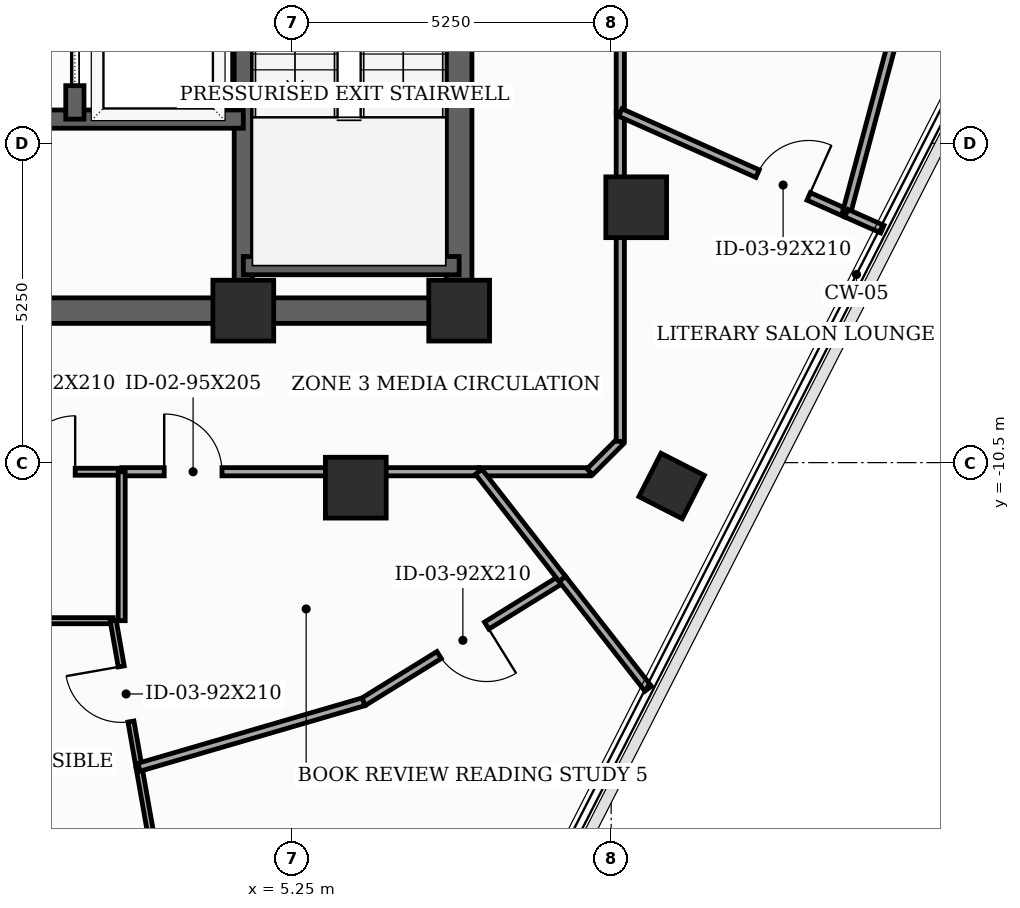
"""IFC4 building model, lengths in metres.
Left out: names, types, materials, properties, quantities, classifications, styles, units other than length and angle.
Written with IfcOpenShell. Run it as: python <this file> out.ifc"""

import sys

from ifc_helpers import new_model, si_unit, direction, frame, frame_2d, origin, origin_2d, place, context, subcontext, project, spatial, rectangle, extrude, element, fill, save


model = new_model("IFC4")
c1 = context("Model", 3, precision=1e-05, world=origin(), true_north=direction((0.0, 1.0)))
c2 = subcontext(c1, "Body", "Model", "MODEL_VIEW")
j1 = project(units=[si_unit("LENGTHUNIT", "METRE"), si_unit("PLANEANGLEUNIT", "RADIAN")], contexts=[c1])
p1 = place(None, origin())
s1 = spatial("IfcSite", under=j1, at=p1, CompositionType="ELEMENT")
p2 = place(p1, origin())
s2 = spatial("IfcBuilding", under=s1, at=p2, CompositionType="ELEMENT")
p3 = place(p2, frame((0.0, 0.0, 248.5)))
s3 = spatial("IfcBuildingStorey", under=s2, at=p3, CompositionType="ELEMENT", Elevation=248.5)
for number, where, z_axis, x_axis in (
    (1, (4.45, -8.0, 0.0), (0.0, 0.0, 1.0), (1.0, 0.0, 0.0)),
    (2, (8.0, -8.0, 0.0), (0.0, 0.0, 1.0), (1.0, 0.0, 0.0)),
    (3, (6.3, -10.912, 0.0), (0.0, 0.0, 1.0), (1.0, 0.0, 0.0)),
    (4, (10.912, -6.3, 0.0), (0.0, 0.0, 1.0), (1.0, 0.0, 0.0)),
):
    element("IfcColumn", number, at=place(p3, frame(where, z_axis=z_axis, x_axis=x_axis)), inside=s3, PredefinedType="COLUMN", context=c2, shape_type="SweptSolid", body=[
        extrude(rectangle(XDim=1.0, YDim=1.0, at=origin_2d()), origin(), (0.0, 0.0, 1.0), 3.7),
    ])
p4 = place(p3, frame((11.494, -10.885, 0.0), z_axis=(0.0, 0.0, 1.0), x_axis=(0.45399049974, 0.891006524188, 0.0)))
e5 = element("IfcColumn", 5, at=p4, inside=s3, PredefinedType="COLUMN", context=c2, shape_type="SweptSolid", body=[
    extrude(rectangle(XDim=0.8, YDim=0.8, at=origin_2d()), origin(), (0.0, 0.0, 1.0), 3.7),
])
p5 = place(p3, frame((8.0, -8.0, 0.0), z_axis=(0.0, 0.0, 1.0), x_axis=(0.0, 1.0, 0.0)))
e6 = element("IfcWall", 6, at=p5, inside=s3, PredefinedType="SHEAR", context=c2, shape_type="SweptSolid", body=[
    extrude(rectangle(XDim=16.0, YDim=0.42, at=frame_2d((8.0, 0.0))), origin(), (0.0, 0.0, 1.0), 3.5),
])
p6 = place(p5, frame((9.6, 0.0, 0.0)))
e7 = element("IfcOpeningElement", 7, at=p6, cuts=e6, PredefinedType="OPENING", context=c2, shape_type="SweptSolid", body=[
    extrude(rectangle(XDim=1.05, YDim=2.15, at=frame_2d((0.525, 1.075))), frame((0.0, 0.22, 0.0), z_axis=(0.0, -1.0, 0.0), x_axis=(1.0, 0.0, 0.0)), (0.0, 0.0, 1.0), 0.44),
])
p7 = place(p5, frame((14.469, 0.0, 0.0)))
e8 = element("IfcOpeningElement", 8, at=p7, cuts=e6, PredefinedType="OPENING", context=c2, shape_type="SweptSolid", body=[
    extrude(rectangle(XDim=0.85, YDim=2.02, at=frame_2d((0.425, 1.01))), frame((0.0, 0.22, 0.0), z_axis=(0.0, -1.0, 0.0), x_axis=(1.0, 0.0, 0.0)), (0.0, 0.0, 1.0), 0.44),
])
p8 = place(p3, frame((-8.0, -8.0, 0.0), z_axis=(0.0, 0.0, 1.0), x_axis=(1.0, 0.0, 0.0)))
e9 = element("IfcWall", 9, at=p8, inside=s3, PredefinedType="SHEAR", context=c2, shape_type="SweptSolid", body=[
    extrude(rectangle(XDim=16.0, YDim=0.42, at=frame_2d((8.0, 0.0))), origin(), (0.0, 0.0, 1.0), 3.5),
])
p9 = place(p8, frame((7.52, 0.0, 0.0)))
e10 = element("IfcOpeningElement", 10, at=p9, cuts=e9, PredefinedType="OPENING", context=c2, shape_type="SweptSolid", body=[
    extrude(rectangle(XDim=0.95, YDim=2.1, at=frame_2d((0.475, 1.05))), frame((0.0, 0.22, 0.0), z_axis=(0.0, -1.0, 0.0), x_axis=(1.0, 0.0, 0.0)), (0.0, 0.0, 1.0), 0.44),
])
p10 = place(p3, frame((4.45, -7.79, 0.0), z_axis=(0.0, 0.0, 1.0), x_axis=(0.0, 1.0, 0.0)))
e11 = element("IfcWall", 11, at=p10, inside=s3, PredefinedType="SHEAR", context=c2, shape_type="SweptSolid", body=[
    extrude(rectangle(XDim=15.58, YDim=0.3, at=frame_2d((7.79, 0.0))), origin(), (0.0, 0.0, 1.0), 3.5),
])
p11 = place(p3, frame((4.45, -7.26, 0.0), z_axis=(0.0, 0.0, 1.0), x_axis=(1.0, 0.0, 0.0)))
e12 = element("IfcWall", 12, at=p11, inside=s3, PredefinedType="SHEAR", context=c2, shape_type="SweptSolid", body=[
    extrude(rectangle(XDim=3.55, YDim=0.3, at=frame_2d((1.775, 0.0))), origin(), (0.0, 0.0, 1.0), 3.5),
])
p12 = place(p3, frame((-4.45, -4.85, 0.0), z_axis=(0.0, 0.0, 1.0), x_axis=(1.0, 0.0, 0.0)))
e13 = element("IfcWall", 13, at=p12, inside=s3, PredefinedType="SHEAR", context=c2, shape_type="SweptSolid", body=[
    extrude(rectangle(XDim=8.9, YDim=0.3, at=frame_2d((4.45, 0.0))), origin(), (0.0, 0.0, 1.0), 3.5),
])
p13 = place(p3, frame((1.68, -4.85, 0.0), z_axis=(0.0, 0.0, 1.0), x_axis=(0.0, 1.0, 0.0)))
e14 = element("IfcWall", 14, at=p13, inside=s3, PredefinedType="SHEAR", context=c2, shape_type="SweptSolid", body=[
    extrude(rectangle(XDim=12.64, YDim=0.3, at=frame_2d((6.32, 0.0))), origin(), (0.0, 0.0, 1.0), 3.5),
])
p14 = place(p13, frame((0.55, 0.0, 0.0)))
e15 = element("IfcOpeningElement", 15, at=p14, cuts=e14, PredefinedType="OPENING", context=c2, shape_type="SweptSolid", body=[
    extrude(rectangle(XDim=1.1, YDim=2.1, at=frame_2d((0.55, 1.05))), frame((0.0, 0.16, 0.0), z_axis=(0.0, -1.0, 0.0), x_axis=(1.0, 0.0, 0.0)), (0.0, 0.0, 1.0), 0.32),
])
p15 = place(p13, frame((2.65, 0.0, 0.0)))
e16 = element("IfcOpeningElement", 16, at=p15, cuts=e14, PredefinedType="OPENING", context=c2, shape_type="SweptSolid", body=[
    extrude(rectangle(XDim=1.1, YDim=2.1, at=frame_2d((0.55, 1.05))), frame((0.0, 0.16, 0.0), z_axis=(0.0, -1.0, 0.0), x_axis=(1.0, 0.0, 0.0)), (0.0, 0.0, 1.0), 0.32),
])
p16 = place(p13, frame((4.75, 0.0, 0.0)))
e17 = element("IfcOpeningElement", 17, at=p16, cuts=e14, PredefinedType="OPENING", context=c2, shape_type="SweptSolid", body=[
    extrude(rectangle(XDim=1.1, YDim=2.1, at=frame_2d((0.55, 1.05))), frame((0.0, 0.16, 0.0), z_axis=(0.0, -1.0, 0.0), x_axis=(1.0, 0.0, 0.0)), (0.0, 0.0, 1.0), 0.32),
])
p17 = place(p13, frame((8.9, 0.0, 0.0)))
e18 = element("IfcOpeningElement", 18, at=p17, cuts=e14, PredefinedType="OPENING", context=c2, shape_type="SweptSolid", body=[
    extrude(rectangle(XDim=0.95, YDim=2.1, at=frame_2d((0.475, 1.05))), frame((0.0, 0.16, 0.0), z_axis=(0.0, -1.0, 0.0), x_axis=(1.0, 0.0, 0.0)), (0.0, 0.0, 1.0), 0.32),
])
p18 = place(p3, frame((10.65, -4.742, 0.0), z_axis=(0.0, 0.0, 1.0), x_axis=(0.0, 1.0, 0.0)))
e19 = element("IfcWall", 19, at=p18, inside=s3, PredefinedType="PARTITIONING", context=c2, shape_type="SweptSolid", body=[
    extrude(rectangle(XDim=6.224, YDim=0.135, at=frame_2d((3.112, 0.0))), origin(), (0.0, 0.0, 1.0), 2.885),
])
p19 = place(p18, frame((2.637, 0.0, 0.0)))
e20 = element("IfcOpeningElement", 20, at=p19, cuts=e19, PredefinedType="OPENING", context=c2, shape_type="SweptSolid", body=[
    extrude(rectangle(XDim=0.95, YDim=2.1, at=frame_2d((0.475, 1.05))), frame((0.0, 0.077, 0.0), z_axis=(0.0, -1.0, 0.0), x_axis=(1.0, 0.0, 0.0)), (0.0, 0.0, 1.0), 0.155),
])
p20 = place(p3, frame((0.0, -10.65, 0.0), z_axis=(0.0, 0.0, 1.0), x_axis=(1.0, 0.0, 0.0)))
e21 = element("IfcWall", 21, at=p20, inside=s3, PredefinedType="PARTITIONING", context=c2, shape_type="SweptSolid", body=[
    extrude(rectangle(XDim=2.45, YDim=0.115, at=frame_2d((1.225, 0.0))), origin(), (0.0, 0.0, 1.0), 3.5),
])
p21 = place(p20, frame((0.765, 0.0, 0.0)))
e22 = element("IfcOpeningElement", 22, at=p21, cuts=e21, PredefinedType="OPENING", context=c2, shape_type="SweptSolid", body=[
    extrude(rectangle(XDim=0.92, YDim=2.1, at=frame_2d((0.46, 1.05))), frame((0.0, 0.067, 0.0), z_axis=(0.0, -1.0, 0.0), x_axis=(1.0, 0.0, 0.0)), (0.0, 0.0, 1.0), 0.135),
])
p22 = place(p3, frame((2.45, -10.65, 0.0), z_axis=(0.0, 0.0, 1.0), x_axis=(1.0, 0.0, 0.0)))
e23 = element("IfcWall", 23, at=p22, inside=s3, PredefinedType="PARTITIONING", context=c2, shape_type="SweptSolid", body=[
    extrude(rectangle(XDim=5.871, YDim=0.135, at=frame_2d((2.936, 0.0))), origin(), (0.0, 0.0, 1.0), 2.075),
])
p23 = place(p22, frame((0.699, 0.0, 0.0)))
e24 = element("IfcOpeningElement", 24, at=p23, cuts=e23, PredefinedType="OPENING", context=c2, shape_type="SweptSolid", body=[
    extrude(rectangle(XDim=0.95, YDim=2.025, at=frame_2d((0.475, 1.012))), frame((0.0, 0.077, 0.0), z_axis=(0.0, -1.0, 0.0), x_axis=(1.0, 0.0, 0.0)), (0.0, 0.0, 1.0), 0.155),
])
p24 = place(p3, frame((8.321, -10.65, 0.0), z_axis=(0.0, 0.0, 1.0), x_axis=(1.0, 0.0, 0.0)))
e25 = element("IfcWall", 25, at=p24, inside=s3, PredefinedType="PARTITIONING", context=c2, shape_type="SweptSolid", body=[
    extrude(rectangle(XDim=1.829, YDim=0.135, at=frame_2d((0.915, 0.0))), origin(), (0.0, 0.0, 1.0), 2.075),
])
p25 = place(p3, frame((10.15, -10.65, 0.0), z_axis=(0.0, 0.0, 1.0), x_axis=(0.707106781187, 0.707106781187, 0.0)))
e26 = element("IfcWall", 26, at=p25, inside=s3, PredefinedType="PARTITIONING", context=c2, shape_type="SweptSolid", body=[
    extrude(rectangle(XDim=0.707, YDim=0.135, at=frame_2d((0.354, 0.0))), origin(), (0.0, 0.0, 1.0), 2.075),
])
p26 = place(p3, frame((10.65, -10.15, 0.0), z_axis=(0.0, 0.0, 1.0), x_axis=(0.0, 1.0, 0.0)))
e27 = element("IfcWall", 27, at=p26, inside=s3, PredefinedType="PARTITIONING", context=c2, shape_type="SweptSolid", body=[
    extrude(rectangle(XDim=5.408, YDim=0.135, at=frame_2d((2.704, 0.0))), origin(), (0.0, 0.0, 1.0), 2.885),
])
p27 = place(p3, frame((10.65, -4.742, 0.0), z_axis=(0.0, 0.0, 1.0), x_axis=(0.913526929547, -0.406778255309, 0.0)))
e28 = element("IfcWall", 28, at=p27, inside=s3, PredefinedType="PARTITIONING", context=c2, shape_type="SweptSolid", body=[
    extrude(rectangle(XDim=4.071, YDim=0.135, at=frame_2d((2.036, 0.0))), origin(), (0.0, 0.0, 1.0), 2.885),
])
p28 = place(p27, frame((2.471, 0.0, 0.0)))
e29 = element("IfcOpeningElement", 29, at=p28, cuts=e28, PredefinedType="OPENING", context=c2, shape_type="SweptSolid", body=[
    extrude(rectangle(XDim=0.92, YDim=2.1, at=frame_2d((0.46, 1.05))), frame((0.0, 0.077, 0.0), z_axis=(0.0, -1.0, 0.0), x_axis=(1.0, 0.0, 0.0)), (0.0, 0.0, 1.0), 0.155),
])
p29 = place(p3, frame((14.369, -6.398, 0.0), z_axis=(0.0, 0.0, 1.0), x_axis=(0.258820640976, 0.965925398675, 0.0)))
e30 = element("IfcWall", 30, at=p29, inside=s3, PredefinedType="PARTITIONING", context=c2, shape_type="SweptSolid", body=[
    extrude(rectangle(XDim=5.34, YDim=0.135, at=frame_2d((2.67, 0.0))), origin(), (0.0, 0.0, 1.0), 3.025),
])
p30 = place(p3, frame((2.31, -13.1, 0.0), z_axis=(0.0, 0.0, 1.0), x_axis=(-1.0, 0.0, 0.0)))
e31 = element("IfcWall", 31, at=p30, inside=s3, PredefinedType="MOVABLE", context=c2, shape_type="SweptSolid", body=[
    extrude(rectangle(XDim=2.31, YDim=0.1, at=frame_2d((1.155, 0.0))), origin(), (0.0, 0.0, 1.0), 3.5),
])
p31 = place(p3, frame((4.719, -26.759, 0.0), z_axis=(0.0, 0.0, 1.0), x_axis=(-0.173635361328, 0.984810012793, 0.0)))
e32 = element("IfcWall", 32, at=p31, inside=s3, PredefinedType="MOVABLE", context=c2, shape_type="SweptSolid", body=[
    extrude(rectangle(XDim=11.423, YDim=0.1, at=frame_2d((5.711, 0.0))), origin(), (0.0, 0.0, 1.0), 3.035),
])
p32 = place(p3, frame((2.735, -15.51, 0.0), z_axis=(0.0, 0.0, 1.0), x_axis=(-0.173694270709, 0.984799624453, 0.0)))
e33 = element("IfcWall", 33, at=p32, inside=s3, PredefinedType="MOVABLE", context=c2, shape_type="SweptSolid", body=[
    extrude(rectangle(XDim=2.447, YDim=0.1, at=frame_2d((1.224, 0.0))), origin(), (0.0, 0.0, 1.0), 3.185),
])
p33 = place(p32, frame((0.764, 0.0, 0.0)))
e34 = element("IfcOpeningElement", 34, at=p33, cuts=e33, PredefinedType="OPENING", context=c2, shape_type="SweptSolid", body=[
    extrude(rectangle(XDim=0.92, YDim=2.1, at=frame_2d((0.46, 1.05))), frame((0.0, 0.06, 0.0), z_axis=(0.0, -1.0, 0.0), x_axis=(1.0, 0.0, 0.0)), (0.0, 0.0, 1.0), 0.12),
])
p34 = place(p3, frame((2.45, -13.1, 0.0), z_axis=(0.0, 0.0, 1.0), x_axis=(0.0, 1.0, 0.0)))
e35 = element("IfcWall", 35, at=p34, inside=s3, PredefinedType="PARTITIONING", context=c2, shape_type="SweptSolid", body=[
    extrude(rectangle(XDim=2.45, YDim=0.115, at=frame_2d((1.225, 0.0))), origin(), (0.0, 0.0, 1.0), 2.885),
])
p35 = place(p3, frame((9.696, -12.411, 0.0), z_axis=(0.0, 0.0, 1.0), x_axis=(-0.850393663863, -0.526146953295, 0.0)))
e36 = element("IfcWall", 36, at=p35, inside=s3, PredefinedType="PARTITIONING", context=c2, shape_type="SweptSolid", body=[
    extrude(rectangle(XDim=3.845, YDim=0.135, at=frame_2d((1.923, 0.0))), origin(), (0.0, 0.0, 1.0), 3.035),
])
p36 = place(p35, frame((1.463, 0.0, 0.0)))
e37 = element("IfcOpeningElement", 37, at=p36, cuts=e36, PredefinedType="OPENING", context=c2, shape_type="SweptSolid", body=[
    extrude(rectangle(XDim=0.92, YDim=2.1, at=frame_2d((0.46, 1.05))), frame((0.0, 0.077, 0.0), z_axis=(0.0, -1.0, 0.0), x_axis=(1.0, 0.0, 0.0)), (0.0, 0.0, 1.0), 0.155),
])
p37 = place(p3, frame((6.426, -14.434, 0.0), z_axis=(0.0, 0.0, 1.0), x_axis=(-0.960041241254, -0.279858562654, 0.0)))
e38 = element("IfcWall", 38, at=p37, inside=s3, PredefinedType="PARTITIONING", context=c2, shape_type="SweptSolid", body=[
    extrude(rectangle(XDim=3.844, YDim=0.135, at=frame_2d((1.922, 0.0))), origin(), (0.0, 0.0, 1.0), 3.185),
])
p38 = place(p3, frame((11.108, -14.218, 0.0), z_axis=(0.0, 0.0, 1.0), x_axis=(-0.615736984334, 0.787951753677, 0.0)))
e39 = element("IfcWall", 39, at=p38, inside=s3, PredefinedType="PARTITIONING", context=c2, shape_type="SweptSolid", body=[
    extrude(rectangle(XDim=2.294, YDim=0.135, at=frame_2d((1.147, 0.0))), origin(), (0.0, 0.0, 1.0), 3.025),
])
p39 = place(p3, frame((9.696, -12.411, 0.0), z_axis=(0.0, 0.0, 1.0), x_axis=(-0.615429845305, 0.788191668002, 0.0)))
e40 = element("IfcWall", 40, at=p39, inside=s3, PredefinedType="PARTITIONING", context=c2, shape_type="SweptSolid", body=[
    extrude(rectangle(XDim=2.234, YDim=0.135, at=frame_2d((1.117, 0.0))), origin(), (0.0, 0.0, 1.0), 2.075),
])
p40 = place(p3, frame((14.959, -6.66, 0.0), z_axis=(0.0, 0.0, 1.0), x_axis=(-0.913967286969, 0.405787873586, 0.0)))
e41 = element("IfcWall", 41, at=p40, inside=s3, PredefinedType="PARTITIONING", context=c2, shape_type="SweptSolid", body=[
    extrude(rectangle(XDim=0.646, YDim=0.135, at=frame_2d((0.323, 0.0))), origin(), (0.0, 0.0, 1.0), 3.49),
])
p41 = place(p14, origin())
e42 = element("IfcDoor", 42, at=p41, inside=s3, OperationType="SLIDING_TO_LEFT", PredefinedType="DOOR", context=c2, shape_type="SweptSolid", body=[
    extrude(rectangle(XDim=1.1, YDim=2.1, at=frame_2d((0.55, 1.05))), frame((0.0, 0.025, 0.0), z_axis=(0.0, -1.0, 0.0), x_axis=(1.0, 0.0, 0.0)), (0.0, 0.0, 1.0), 0.05),
])
fill(e15, e42)
p42 = place(p21, origin())
e43 = element("IfcDoor", 43, at=p42, inside=s3, OperationType="SINGLE_SWING_RIGHT", PredefinedType="DOOR", context=c2, shape_type="SweptSolid", body=[
    extrude(rectangle(XDim=0.92, YDim=2.1, at=frame_2d((0.46, 1.05))), frame((0.0, 0.025, 0.0), z_axis=(0.0, -1.0, 0.0), x_axis=(1.0, 0.0, 0.0)), (0.0, 0.0, 1.0), 0.05),
])
fill(e22, e43)
p43 = place(p23, origin())
e44 = element("IfcDoor", 44, at=p43, inside=s3, OperationType="SINGLE_SWING_LEFT", PredefinedType="DOOR", context=c2, shape_type="SweptSolid", body=[
    extrude(rectangle(XDim=0.95, YDim=2.025, at=frame_2d((0.475, 1.012))), frame((0.0, 0.025, 0.0), z_axis=(0.0, -1.0, 0.0), x_axis=(1.0, 0.0, 0.0)), (0.0, 0.0, 1.0), 0.05),
])
fill(e24, e44)
p44 = place(p28, origin())
e45 = element("IfcDoor", 45, at=p44, inside=s3, OperationType="SINGLE_SWING_RIGHT", PredefinedType="DOOR", context=c2, shape_type="SweptSolid", body=[
    extrude(rectangle(XDim=0.92, YDim=2.1, at=frame_2d((0.46, 1.05))), frame((0.0, 0.025, 0.0), z_axis=(0.0, -1.0, 0.0), x_axis=(1.0, 0.0, 0.0)), (0.0, 0.0, 1.0), 0.05),
])
fill(e29, e45)
p45 = place(p33, origin())
e46 = element("IfcDoor", 46, at=p45, inside=s3, OperationType="SINGLE_SWING_RIGHT", PredefinedType="DOOR", context=c2, shape_type="SweptSolid", body=[
    extrude(rectangle(XDim=0.92, YDim=2.1, at=frame_2d((0.46, 1.05))), frame((0.0, 0.025, 0.0), z_axis=(0.0, -1.0, 0.0), x_axis=(1.0, 0.0, 0.0)), (0.0, 0.0, 1.0), 0.05),
])
fill(e34, e46)
p46 = place(p36, origin())
e47 = element("IfcDoor", 47, at=p46, inside=s3, OperationType="SINGLE_SWING_LEFT", PredefinedType="DOOR", context=c2, shape_type="SweptSolid", body=[
    extrude(rectangle(XDim=0.92, YDim=2.1, at=frame_2d((0.46, 1.05))), frame((0.0, 0.025, 0.0), z_axis=(0.0, -1.0, 0.0), x_axis=(1.0, 0.0, 0.0)), (0.0, 0.0, 1.0), 0.05),
])
fill(e37, e47)
save(model, sys.argv[1])
